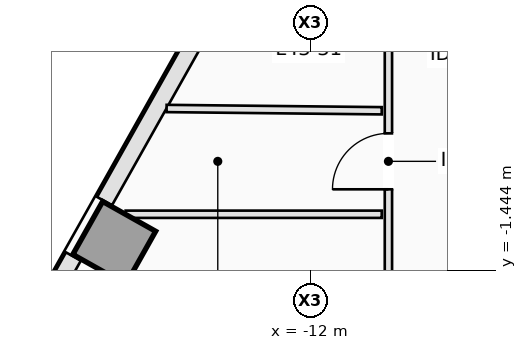
"""IFC4 building model, lengths in metres.
Left out: names, types, materials, properties, quantities, classifications, styles, units other than length and angle.
Written with IfcOpenShell. Run it as: python <this file> out.ifc"""

import sys

from ifc_helpers import new_model, si_unit, direction, frame, frame_2d, origin, origin_2d, place, context, subcontext, project, spatial, rectangle, extrude, element, fill, save


model = new_model("IFC4")
c1 = context("Model", 3, precision=1e-05, world=origin(), true_north=direction((0.0, 1.0)))
c2 = subcontext(c1, "Body", "Model", "MODEL_VIEW")
j1 = project(units=[si_unit("LENGTHUNIT", "METRE"), si_unit("PLANEANGLEUNIT", "RADIAN")], contexts=[c1])
p1 = place(None, origin())
s1 = spatial("IfcSite", under=j1, at=p1, CompositionType="ELEMENT")
p2 = place(p1, origin())
s2 = spatial("IfcBuilding", under=s1, at=p2, CompositionType="ELEMENT")
p3 = place(p2, frame((0.0, 0.0, 158.0)))
s3 = spatial("IfcBuildingStorey", under=s2, at=p3, CompositionType="ELEMENT", Elevation=158.0)
p4 = place(p3, frame((-15.224, -0.991, 0.0), z_axis=(0.0, 0.0, 1.0), x_axis=(-0.871575139605, 0.490261946333, 0.0)))
e1 = element("IfcColumn", 1, at=p4, inside=s3, PredefinedType="COLUMN", context=c2, shape_type="SweptSolid", body=[
    extrude(rectangle(XDim=1.0, YDim=1.0, at=origin_2d()), origin(), (0.0, 0.0, 1.0), 3.5),
])
p5 = place(p3, frame((-16.121, -1.616, 0.0), z_axis=(0.0, 0.0, 1.0), x_axis=(0.490009165718, 0.871717280724, 0.0)))
e2 = element("IfcWall", 2, at=p5, inside=s3, PredefinedType="STANDARD", context=c2, shape_type="SweptSolid", body=[
    extrude(rectangle(XDim=0.46, YDim=0.28, at=frame_2d((0.23, 0.0))), origin(), (0.0, 0.0, 1.0), 3.25),
])
p6 = place(p3, frame((-15.383, -0.305, 0.0), z_axis=(0.0, 0.0, 1.0), x_axis=(0.490232095789, 0.871591929895, 0.0)))
e3 = element("IfcWall", 3, at=p6, inside=s3, PredefinedType="STANDARD", context=c2, shape_type="SweptSolid", body=[
    extrude(rectangle(XDim=4.375, YDim=0.28, at=frame_2d((2.188, 0.0))), origin(), (0.0, 0.0, 1.0), 3.25),
])
p7 = place(p3, frame((-10.715, -2.338, 0.0), z_axis=(0.0, 0.0, 1.0), x_axis=(0.0, 1.0, 0.0)))
e4 = element("IfcWall", 4, at=p7, inside=s3, PredefinedType="PARTITIONING", context=c2, shape_type="SweptSolid", body=[
    extrude(rectangle(XDim=7.854, YDim=0.12, at=frame_2d((3.927, 0.0))), origin(), (0.0, 0.0, 1.0), 3.25),
])
p8 = place(p7, frame((5.117, 0.0, 0.0)))
e5 = element("IfcOpeningElement", 5, at=p8, cuts=e4, PredefinedType="OPENING", context=c2, shape_type="SweptSolid", body=[
    extrude(rectangle(XDim=0.92, YDim=2.12, at=frame_2d((0.46, 1.06))), frame((0.0, 0.07, 0.0), z_axis=(0.0, -1.0, 0.0), x_axis=(1.0, 0.0, 0.0)), (0.0, 0.0, 1.0), 0.14),
])
p9 = place(p7, frame((2.228, 0.0, 0.0)))
e6 = element("IfcOpeningElement", 6, at=p9, cuts=e4, PredefinedType="OPENING", context=c2, shape_type="SweptSolid", body=[
    extrude(rectangle(XDim=0.92, YDim=2.12, at=frame_2d((0.46, 1.06))), frame((0.0, 0.07, 0.0), z_axis=(0.0, -1.0, 0.0), x_axis=(1.0, 0.0, 0.0)), (0.0, 0.0, 1.0), 0.14),
])
p10 = place(p3, frame((-10.825, 1.182, 0.0), z_axis=(0.0, 0.0, 1.0), x_axis=(-0.999943542972, 0.010625952637, 0.0)))
e7 = element("IfcWall", 7, at=p10, inside=s3, PredefinedType="PARTITIONING", context=c2, shape_type="SweptSolid", body=[
    extrude(rectangle(XDim=3.538, YDim=0.12, at=frame_2d((1.769, 0.0))), origin(), (0.0, 0.0, 1.0), 3.25),
])
p11 = place(p3, frame((-10.825, -0.52, 0.0), z_axis=(0.0, 0.0, 1.0), x_axis=(-1.0, 0.0, 0.0)))
e8 = element("IfcWall", 8, at=p11, inside=s3, PredefinedType="PARTITIONING", context=c2, shape_type="SweptSolid", body=[
    extrude(rectangle(XDim=4.211, YDim=0.12, at=frame_2d((2.106, 0.0))), origin(), (0.0, 0.0, 1.0), 3.25),
])
p12 = place(p9, origin())
e9 = element("IfcDoor", 9, at=p12, inside=s3, OperationType="SINGLE_SWING_LEFT", PredefinedType="DOOR", context=c2, shape_type="SweptSolid", body=[
    extrude(rectangle(XDim=0.92, YDim=2.12, at=frame_2d((0.46, 1.06))), frame((0.0, 0.025, 0.0), z_axis=(0.0, -1.0, 0.0), x_axis=(1.0, 0.0, 0.0)), (0.0, 0.0, 1.0), 0.05),
])
fill(e6, e9)
save(model, sys.argv[1])
